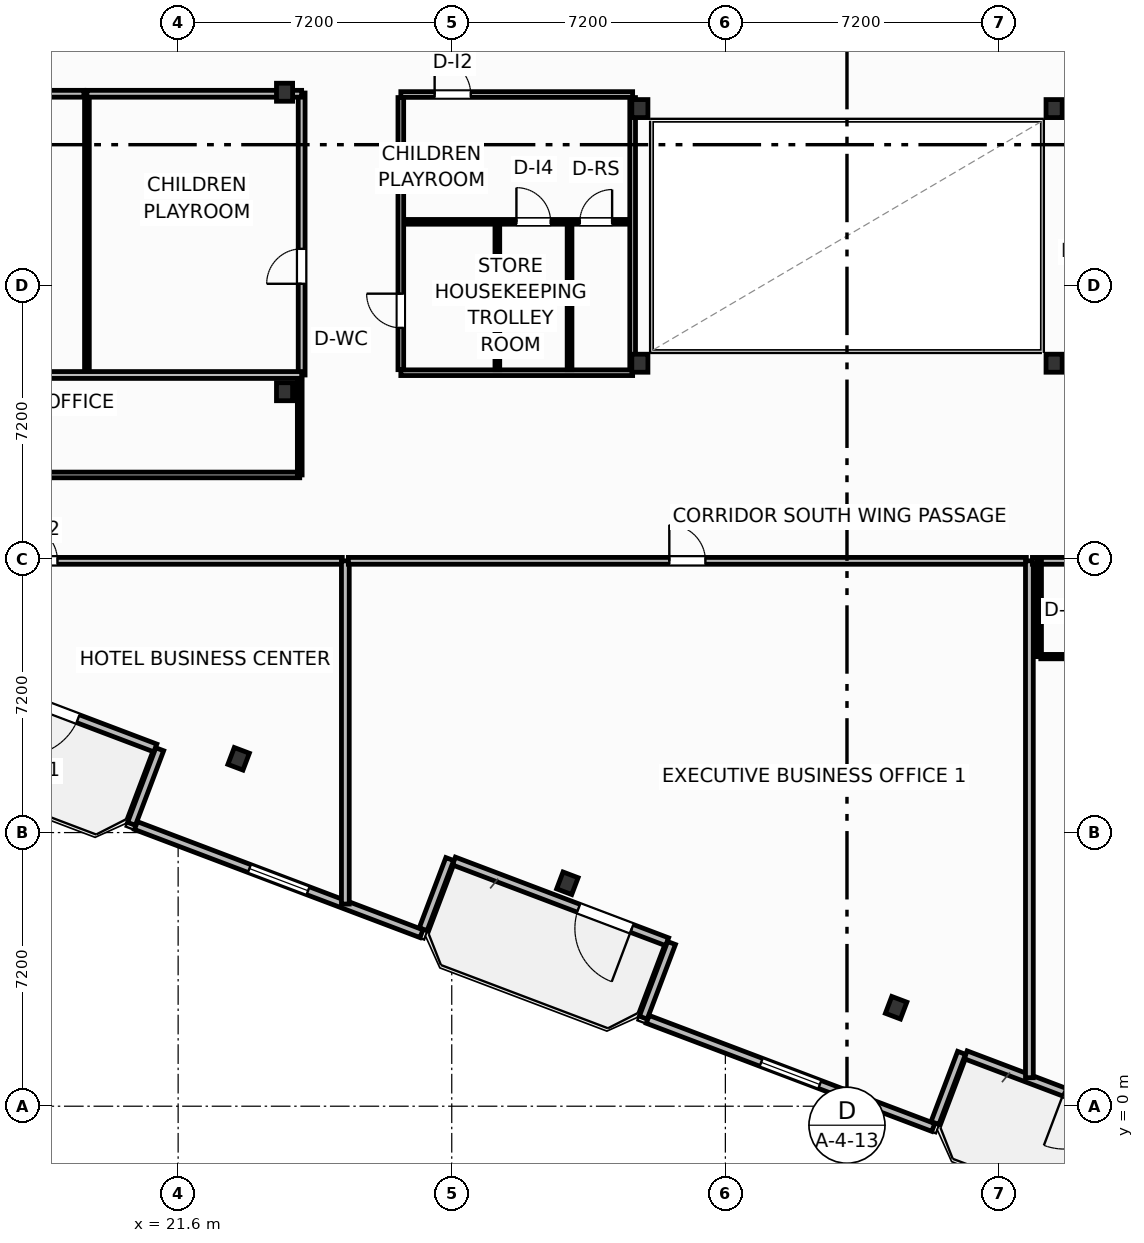
"""IFC4 building model, lengths in metres.
Left out: names, types, materials, properties, quantities, classifications, styles, units other than length and angle.
Written with IfcOpenShell. Run it as: python <this file> out.ifc"""

import sys

from ifc_helpers import new_model, si_unit, direction, frame, frame_2d, origin, origin_2d, place, context, subcontext, project, spatial, rectangle, i_section, extrude, element, fill, save


model = new_model("IFC4")
c1 = context("Model", 3, precision=1e-05, world=origin(), true_north=direction((0.0, 1.0)))
c2 = subcontext(c1, "Body", "Model", "MODEL_VIEW")
j1 = project(units=[si_unit("LENGTHUNIT", "METRE"), si_unit("PLANEANGLEUNIT", "RADIAN")], contexts=[c1])
p1 = place(None, origin())
s1 = spatial("IfcSite", under=j1, at=p1, CompositionType="ELEMENT")
p2 = place(p1, origin())
s2 = spatial("IfcBuilding", under=s1, at=p2, CompositionType="ELEMENT")
p3 = place(p2, frame((0.0, 0.0, 94.7)))
s3 = spatial("IfcBuildingStorey", under=s2, at=p3, CompositionType="ELEMENT", Elevation=94.7)
for number, where, z_axis, x_axis in (
    (1, (33.75, 19.55, 0.0), (0.0, 0.0, 1.0), (1.0, 0.0, 0.0)),
    (2, (44.65, 19.55, 0.0), (0.0, 0.0, 1.0), (1.0, 0.0, 0.0)),
    (3, (33.75, 26.25, 0.0), (0.0, 0.0, 1.0), (1.0, 0.0, 0.0)),
    (4, (44.65, 26.25, 0.0), (0.0, 0.0, 1.0), (1.0, 0.0, 0.0)),
    (5, (24.4, 18.8, 0.0), (0.0, 0.0, 1.0), (1.0, 0.0, 0.0)),
    (6, (24.4, 26.68, 0.0), (0.0, 0.0, 1.0), (1.0, 0.0, 0.0)),
    (7, (23.192, 9.141, 0.0), (0.0, 0.0, 1.0), (0.935, -0.354, 0.0)),
    (8, (31.843, 5.866, 0.0), (0.0, 0.0, 1.0), (0.935, -0.354, 0.0)),
    (9, (40.493, 2.591, 0.0), (0.0, 0.0, 1.0), (0.935, -0.354, 0.0)),
):
    element("IfcColumn", number, at=place(p3, frame(where, z_axis=z_axis, x_axis=x_axis)), inside=s3, PredefinedType="COLUMN", context=c2, shape_type="SweptSolid", body=[
        extrude(i_section(OverallWidth=0.424, OverallDepth=0.474, WebThickness=0.048, FlangeThickness=0.077, FilletRadius=0.025, at=origin_2d()), origin(), (0.0, 0.0, 1.0), 3.7),
    ])
p4 = place(p3, frame((21.0, 9.425, 0.0), z_axis=(0.0, 0.0, 1.0), x_axis=(-0.93521416643, 0.354082565101, 0.0)))
e10 = element("IfcWall", 10, at=p4, inside=s3, PredefinedType="SOLIDWALL", context=c2, shape_type="SweptSolid", body=[
    extrude(rectangle(XDim=6.0, YDim=0.22, at=frame_2d((3.0, 0.0))), origin(), (0.0, 0.0, 1.0), 2.73),
])
p5 = place(p4, frame((2.176, 0.0, 0.0)))
e11 = element("IfcOpeningElement", 11, at=p5, cuts=e10, PredefinedType="OPENING", context=c2, shape_type="SweptSolid", body=[
    extrude(rectangle(XDim=1.5, YDim=2.25, at=frame_2d((0.75, 1.125))), frame((0.0, 0.12, 0.0), z_axis=(0.0, -1.0, 0.0), x_axis=(1.0, 0.0, 0.0)), (0.0, 0.0, 1.0), 0.24),
])
p6 = place(p3, frame((34.468, 4.327, 0.0), z_axis=(0.0, 0.0, 1.0), x_axis=(-0.9352192676, 0.354069091436, 0.0)))
e12 = element("IfcWall", 12, at=p6, inside=s3, PredefinedType="SOLIDWALL", context=c2, shape_type="SweptSolid", body=[
    extrude(rectangle(XDim=6.0, YDim=0.22, at=frame_2d((3.0, 0.0))), origin(), (0.0, 0.0, 1.0), 2.73),
])
p7 = place(p6, frame((0.992, 0.0, 0.0)))
e13 = element("IfcOpeningElement", 13, at=p7, cuts=e12, PredefinedType="OPENING", context=c2, shape_type="SweptSolid", body=[
    extrude(rectangle(XDim=1.5, YDim=2.25, at=frame_2d((0.75, 1.125))), frame((0.0, 0.12, 0.0), z_axis=(0.0, -1.0, 0.0), x_axis=(1.0, 0.0, 0.0)), (0.0, 0.0, 1.0), 0.24),
])
p8 = place(p3, frame((47.935, -0.771, 0.0), z_axis=(0.0, 0.0, 1.0), x_axis=(-0.935227640088, 0.354046976001, 0.0)))
e14 = element("IfcWall", 14, at=p8, inside=s3, PredefinedType="SOLIDWALL", context=c2, shape_type="SweptSolid", body=[
    extrude(rectangle(XDim=6.0, YDim=0.22, at=frame_2d((3.0, 0.0))), origin(), (0.0, 0.0, 1.0), 2.73),
])
p9 = place(p8, frame((1.732, 0.0, 0.0)))
e15 = element("IfcOpeningElement", 15, at=p9, cuts=e14, PredefinedType="OPENING", context=c2, shape_type="SweptSolid", body=[
    extrude(rectangle(XDim=1.5, YDim=2.25, at=frame_2d((0.75, 1.125))), frame((0.0, 0.12, 0.0), z_axis=(0.0, -1.0, 0.0), x_axis=(1.0, 0.0, 0.0)), (0.0, 0.0, 1.0), 0.24),
])
p10 = place(p3, frame((21.116, 9.392, 0.0), z_axis=(0.0, 0.0, 1.0), x_axis=(-0.353988291547, -0.935249854022, 0.0)))
e16 = element("IfcWall", 16, at=p10, inside=s3, PredefinedType="SOLIDWALL", context=c2, shape_type="SweptSolid", body=[
    extrude(rectangle(XDim=2.1, YDim=0.22, at=frame_2d((1.05, 0.0))), origin(), (0.0, 0.0, 1.0), 2.73),
])
p11 = place(p3, frame((20.49, 7.384, 0.0), z_axis=(0.0, 0.0, 1.0), x_axis=(0.935230796934, -0.354038636968, 0.0)))
e17 = element("IfcWall", 17, at=p11, inside=s3, PredefinedType="SOLIDWALL", context=c2, shape_type="SweptSolid", body=[
    extrude(rectangle(XDim=8.035, YDim=0.22, at=frame_2d((4.018, 0.0))), origin(), (0.0, 0.0, 1.0), 2.73),
])
p12 = place(p11, frame((3.192, 0.0, 0.8)))
e18 = element("IfcOpeningElement", 18, at=p12, cuts=e17, PredefinedType="OPENING", context=c2, shape_type="SweptSolid", body=[
    extrude(rectangle(XDim=1.65, YDim=1.65, at=frame_2d((0.825, 0.825))), frame((0.0, 0.12, 0.0), z_axis=(0.0, -1.0, 0.0), x_axis=(1.0, 0.0, 0.0)), (0.0, 0.0, 1.0), 0.24),
])
p13 = place(p3, frame((28.048, 4.656, 0.0), z_axis=(0.0, 0.0, 1.0), x_axis=(0.354128791944, 0.935196663123, 0.0)))
e19 = element("IfcWall", 19, at=p13, inside=s3, PredefinedType="SOLIDWALL", context=c2, shape_type="SweptSolid", body=[
    extrude(rectangle(XDim=1.975, YDim=0.22, at=frame_2d((0.988, 0.0))), origin(), (0.0, 0.0, 1.0), 2.73),
])
p14 = place(p3, frame((34.583, 4.294, 0.0), z_axis=(0.0, 0.0, 1.0), x_axis=(-0.354128469405, -0.935196785258, 0.0)))
e20 = element("IfcWall", 20, at=p14, inside=s3, PredefinedType="SOLIDWALL", context=c2, shape_type="SweptSolid", body=[
    extrude(rectangle(XDim=2.1, YDim=0.22, at=frame_2d((1.05, 0.0))), origin(), (0.0, 0.0, 1.0), 2.73),
])
p15 = place(p3, frame((33.957, 2.286, 0.0), z_axis=(0.0, 0.0, 1.0), x_axis=(0.935220736163, -0.354065212427, 0.0)))
e21 = element("IfcWall", 21, at=p15, inside=s3, PredefinedType="SOLIDWALL", context=c2, shape_type="SweptSolid", body=[
    extrude(rectangle(XDim=8.035, YDim=0.22, at=frame_2d((4.018, 0.0))), origin(), (0.0, 0.0, 1.0), 2.73),
])
p16 = place(p15, frame((3.192, 0.0, 0.8)))
e22 = element("IfcOpeningElement", 22, at=p16, cuts=e21, PredefinedType="OPENING", context=c2, shape_type="SweptSolid", body=[
    extrude(rectangle(XDim=1.65, YDim=1.65, at=frame_2d((0.825, 0.825))), frame((0.0, 0.12, 0.0), z_axis=(0.0, -1.0, 0.0), x_axis=(1.0, 0.0, 0.0)), (0.0, 0.0, 1.0), 0.24),
])
p17 = place(p3, frame((41.516, -0.442, 0.0), z_axis=(0.0, 0.0, 1.0), x_axis=(0.354061611705, 0.935222099352, 0.0)))
e23 = element("IfcWall", 23, at=p17, inside=s3, PredefinedType="SOLIDWALL", context=c2, shape_type="SweptSolid", body=[
    extrude(rectangle(XDim=1.975, YDim=0.22, at=frame_2d((0.987, 0.0))), origin(), (0.0, 0.0, 1.0), 2.73),
])
p18 = place(p3, frame((5.0, 16.61, 0.0), z_axis=(0.0, 0.0, 1.0), x_axis=(1.0, 0.0, 0.0)))
e24 = element("IfcWall", 24, at=p18, inside=s3, PredefinedType="PARTITIONING", context=c2, shape_type="SweptSolid", body=[
    extrude(rectangle(XDim=19.8, YDim=0.15, at=frame_2d((9.9, 0.0))), origin(), (0.0, 0.0, 1.0), 3.45),
])
p19 = place(p18, frame((11.66, 0.0, 0.0)))
e25 = element("IfcOpeningElement", 25, at=p19, cuts=e24, PredefinedType="OPENING", context=c2, shape_type="SweptSolid", body=[
    extrude(rectangle(XDim=0.92, YDim=2.05, at=frame_2d((0.46, 1.025))), frame((0.0, 0.085, 0.0), z_axis=(0.0, -1.0, 0.0), x_axis=(1.0, 0.0, 0.0)), (0.0, 0.0, 1.0), 0.17),
])
p20 = place(p3, frame((24.8, 16.61, 0.0), z_axis=(0.0, 0.0, 1.0), x_axis=(0.0, 1.0, 0.0)))
e26 = element("IfcWall", 26, at=p20, inside=s3, PredefinedType="PARTITIONING", context=c2, shape_type="SweptSolid", body=[
    extrude(rectangle(XDim=2.63, YDim=0.125, at=frame_2d((1.315, 0.0))), origin(), (0.0, 0.0, 1.0), 3.45),
])
p21 = place(p3, frame((2.146, 14.35, 0.0), z_axis=(0.0, 0.0, 1.0), x_axis=(1.0, 0.0, 0.0)))
e27 = element("IfcWall", 27, at=p21, inside=s3, PredefinedType="PARTITIONING", context=c2, shape_type="SweptSolid", body=[
    extrude(rectangle(XDim=23.774, YDim=0.18, at=frame_2d((11.887, 0.0))), origin(), (0.0, 0.0, 1.0), 3.45),
])
p22 = place(p21, frame((15.329, 0.0, 0.0)))
e28 = element("IfcOpeningElement", 28, at=p22, cuts=e27, PredefinedType="OPENING", context=c2, shape_type="SweptSolid", body=[
    extrude(rectangle(XDim=0.95, YDim=2.05, at=frame_2d((0.475, 1.025))), frame((0.0, 0.1, 0.0), z_axis=(0.0, -1.0, 0.0), x_axis=(1.0, 0.0, 0.0)), (0.0, 0.0, 1.0), 0.2),
])
p23 = place(p3, frame((26.0, 5.319, 0.0), z_axis=(0.0, 0.0, 1.0), x_axis=(0.0, 1.0, 0.0)))
e29 = element("IfcWall", 29, at=p23, inside=s3, PredefinedType="PARTITIONING", context=c2, shape_type="SweptSolid", body=[
    extrude(rectangle(XDim=9.031, YDim=0.205, at=frame_2d((4.515, 0.0))), origin(), (0.0, 0.0, 1.0), 3.45),
])
p24 = place(p3, frame((26.08, 14.35, 0.0), z_axis=(0.0, 0.0, 1.0), x_axis=(1.0, 0.0, 0.0)))
e30 = element("IfcWall", 30, at=p24, inside=s3, PredefinedType="PARTITIONING", context=c2, shape_type="SweptSolid", body=[
    extrude(rectangle(XDim=17.84, YDim=0.18, at=frame_2d((8.92, 0.0))), origin(), (0.0, 0.0, 1.0), 3.45),
])
p25 = place(p24, frame((8.445, 0.0, 0.0)))
e31 = element("IfcOpeningElement", 31, at=p25, cuts=e30, PredefinedType="OPENING", context=c2, shape_type="SweptSolid", body=[
    extrude(rectangle(XDim=0.95, YDim=2.05, at=frame_2d((0.475, 1.025))), frame((0.0, 0.1, 0.0), z_axis=(0.0, -1.0, 0.0), x_axis=(1.0, 0.0, 0.0)), (0.0, 0.0, 1.0), 0.2),
])
p26 = place(p3, frame((44.0, 0.75, 0.0), z_axis=(0.0, 0.0, 1.0), x_axis=(0.0, 1.0, 0.0)))
e32 = element("IfcWall", 32, at=p26, inside=s3, PredefinedType="PARTITIONING", context=c2, shape_type="SweptSolid", body=[
    extrude(rectangle(XDim=13.6, YDim=0.205, at=frame_2d((6.8, 0.0))), origin(), (0.0, 0.0, 1.0), 3.45),
])
p27 = place(p3, frame((44.08, 14.35, 0.0), z_axis=(0.0, 0.0, 1.0), x_axis=(1.0, 0.0, 0.0)))
e33 = element("IfcWall", 33, at=p27, inside=s3, PredefinedType="PARTITIONING", context=c2, shape_type="SweptSolid", body=[
    extrude(rectangle(XDim=14.84, YDim=0.18, at=frame_2d((7.42, 0.0))), origin(), (0.0, 0.0, 1.0), 3.45),
])
p28 = place(p27, frame((3.323, 0.0, 0.0)))
e34 = element("IfcOpeningElement", 34, at=p28, cuts=e33, PredefinedType="OPENING", context=c2, shape_type="SweptSolid", body=[
    extrude(rectangle(XDim=0.95, YDim=2.15, at=frame_2d((0.475, 1.075))), frame((0.0, 0.1, 0.0), z_axis=(0.0, -1.0, 0.0), x_axis=(1.0, 0.0, 0.0)), (0.0, 0.0, 1.0), 0.2),
])
p29 = place(p3, frame((44.3, 11.83, 0.0), z_axis=(0.0, 0.0, 1.0), x_axis=(1.0, 0.0, 0.0)))
e35 = element("IfcWall", 35, at=p29, inside=s3, PredefinedType="PARTITIONING", context=c2, shape_type="SweptSolid", body=[
    extrude(rectangle(XDim=2.15, YDim=0.115, at=frame_2d((1.075, 0.0))), origin(), (0.0, 0.0, 1.0), 3.45),
])
p30 = place(p3, frame((44.26, 11.83, 0.0), z_axis=(0.0, 0.0, 1.0), x_axis=(0.0, 1.0, 0.0)))
e36 = element("IfcWall", 36, at=p30, inside=s3, PredefinedType="PARTITIONING", context=c2, shape_type="SweptSolid", body=[
    extrude(rectangle(XDim=2.52, YDim=0.115, at=frame_2d((1.26, 0.0))), origin(), (0.0, 0.0, 1.0), 3.45),
])
p31 = place(p3, frame((-0.094, 26.64, 0.0), z_axis=(0.0, 0.0, 1.0), x_axis=(1.0, 0.0, 0.0)))
e37 = element("IfcWall", 37, at=p31, inside=s3, PredefinedType="PARTITIONING", context=c2, shape_type="SweptSolid", body=[
    extrude(rectangle(XDim=19.214, YDim=0.18, at=frame_2d((9.607, 0.0))), origin(), (0.0, 0.0, 1.0), 3.45),
])
p32 = place(p31, frame((13.923, 0.0, 0.0)))
e38 = element("IfcOpeningElement", 38, at=p32, cuts=e37, PredefinedType="OPENING", context=c2, shape_type="SweptSolid", body=[
    extrude(rectangle(XDim=0.92, YDim=2.05, at=frame_2d((0.46, 1.025))), frame((0.0, 0.1, 0.0), z_axis=(0.0, -1.0, 0.0), x_axis=(1.0, 0.0, 0.0)), (0.0, 0.0, 1.0), 0.2),
])
p33 = place(p3, frame((24.85, 19.24, 0.0), z_axis=(0.0, 0.0, 1.0), x_axis=(0.0, 1.0, 0.0)))
e39 = element("IfcWall", 39, at=p33, inside=s3, PredefinedType="PARTITIONING", context=c2, shape_type="SweptSolid", body=[
    extrude(rectangle(XDim=7.42, YDim=0.18, at=frame_2d((3.71, 0.0))), origin(), (0.0, 0.0, 1.0), 3.45),
])
p34 = place(p33, frame((2.4, 0.0, 0.0)))
e40 = element("IfcOpeningElement", 40, at=p34, cuts=e39, PredefinedType="OPENING", context=c2, shape_type="SweptSolid", body=[
    extrude(rectangle(XDim=0.92, YDim=2.05, at=frame_2d((0.46, 1.025))), frame((0.0, 0.1, 0.0), z_axis=(0.0, -1.0, 0.0), x_axis=(1.0, 0.0, 0.0)), (0.0, 0.0, 1.0), 0.2),
])
p35 = place(p3, frame((19.2, 19.24, 0.0), z_axis=(0.0, 0.0, 1.0), x_axis=(0.0, 1.0, 0.0)))
e41 = element("IfcWall", 41, at=p35, inside=s3, PredefinedType="PARTITIONING", context=c2, shape_type="SweptSolid", body=[
    extrude(rectangle(XDim=7.42, YDim=0.125, at=frame_2d((3.71, 0.0))), origin(), (0.0, 0.0, 1.0), 3.45),
])
p36 = place(p3, frame((0.2, 19.24, 0.0), z_axis=(0.0, 0.0, 1.0), x_axis=(1.0, 0.0, 0.0)))
e42 = element("IfcWall", 42, at=p36, inside=s3, PredefinedType="PARTITIONING", context=c2, shape_type="SweptSolid", body=[
    extrude(rectangle(XDim=24.65, YDim=0.18, at=frame_2d((12.325, 0.0))), origin(), (0.0, 0.0, 1.0), 3.45),
])
p37 = place(p3, frame((19.2, 26.64, 0.0), z_axis=(0.0, 0.0, 1.0), x_axis=(1.0, 0.0, 0.0)))
e43 = element("IfcWall", 43, at=p37, inside=s3, PredefinedType="PARTITIONING", context=c2, shape_type="SweptSolid", body=[
    extrude(rectangle(XDim=5.65, YDim=0.18, at=frame_2d((2.825, 0.0))), origin(), (0.0, 0.0, 1.0), 2.662),
])
p38 = place(p3, frame((27.46, 26.62, 0.0), z_axis=(0.0, 0.0, 1.0), x_axis=(1.0, 0.0, 0.0)))
e44 = element("IfcWall", 44, at=p38, inside=s3, PredefinedType="PARTITIONING", context=c2, shape_type="SweptSolid", body=[
    extrude(rectangle(XDim=6.1, YDim=0.15, at=frame_2d((3.05, 0.0))), origin(), (0.0, 0.0, 1.0), 2.662),
])
p39 = place(p38, frame((0.89, 0.0, 0.0)))
e45 = element("IfcOpeningElement", 45, at=p39, cuts=e44, PredefinedType="OPENING", context=c2, shape_type="SweptSolid", body=[
    extrude(rectangle(XDim=0.95, YDim=2.05, at=frame_2d((0.475, 1.025))), frame((0.0, 0.085, 0.0), z_axis=(0.0, -1.0, 0.0), x_axis=(1.0, 0.0, 0.0)), (0.0, 0.0, 1.0), 0.17),
])
p40 = place(p3, frame((27.46, 19.3, 0.0), z_axis=(0.0, 0.0, 1.0), x_axis=(1.0, 0.0, 0.0)))
e46 = element("IfcWall", 46, at=p40, inside=s3, PredefinedType="PARTITIONING", context=c2, shape_type="SweptSolid", body=[
    extrude(rectangle(XDim=6.1, YDim=0.15, at=frame_2d((3.05, 0.0))), origin(), (0.0, 0.0, 1.0), 2.662),
])
p41 = place(p3, frame((27.52, 23.27, 0.0), z_axis=(0.0, 0.0, 1.0), x_axis=(1.0, 0.0, 0.0)))
e47 = element("IfcWall", 47, at=p41, inside=s3, PredefinedType="PARTITIONING", context=c2, shape_type="SweptSolid", body=[
    extrude(rectangle(XDim=6.0, YDim=0.125, at=frame_2d((3.0, 0.0))), origin(), (0.0, 0.0, 1.0), 3.45),
])
p42 = place(p41, frame((2.982, 0.0, 0.0)))
e48 = element("IfcOpeningElement", 48, at=p42, cuts=e47, PredefinedType="OPENING", context=c2, shape_type="SweptSolid", body=[
    extrude(rectangle(XDim=0.9, YDim=2.05, at=frame_2d((0.45, 1.025))), frame((0.0, 0.073, 0.0), z_axis=(0.0, -1.0, 0.0), x_axis=(1.0, 0.0, 0.0)), (0.0, 0.0, 1.0), 0.145),
])
p43 = place(p41, frame((4.65, 0.0, 0.0)))
e49 = element("IfcOpeningElement", 49, at=p43, cuts=e47, PredefinedType="OPENING", context=c2, shape_type="SweptSolid", body=[
    extrude(rectangle(XDim=0.85, YDim=2.05, at=frame_2d((0.425, 1.025))), frame((0.0, 0.073, 0.0), z_axis=(0.0, -1.0, 0.0), x_axis=(1.0, 0.0, 0.0)), (0.0, 0.0, 1.0), 0.145),
])
for number, where, z_axis, x_axis in (
    (50, (30.0, 19.38, 0.0), (0.0, 0.0, 1.0), (0.0, 1.0, 0.0)),
    (51, (31.9, 19.38, 0.0), (0.0, 0.0, 1.0), (0.0, 1.0, 0.0)),
):
    element("IfcWall", number, at=place(p3, frame(where, z_axis=z_axis, x_axis=x_axis)), inside=s3, PredefinedType="PARTITIONING", context=c2, shape_type="SweptSolid", body=[
        extrude(rectangle(XDim=3.82, YDim=0.125, at=frame_2d((1.91, 0.0))), origin(), (0.0, 0.0, 1.0), 3.45),
    ])
p44 = place(p3, frame((27.46, 19.38, 0.0), z_axis=(0.0, 0.0, 1.0), x_axis=(0.0, 1.0, 0.0)))
e52 = element("IfcWall", 52, at=p44, inside=s3, PredefinedType="PARTITIONING", context=c2, shape_type="SweptSolid", body=[
    extrude(rectangle(XDim=7.16, YDim=0.15, at=frame_2d((3.58, 0.0))), origin(), (0.0, 0.0, 1.0), 3.45),
])
p45 = place(p44, frame((1.1, 0.0, 0.0)))
e53 = element("IfcOpeningElement", 53, at=p45, cuts=e52, PredefinedType="OPENING", context=c2, shape_type="SweptSolid", body=[
    extrude(rectangle(XDim=0.9, YDim=2.05, at=frame_2d((0.45, 1.025))), frame((0.0, 0.085, 0.0), z_axis=(0.0, -1.0, 0.0), x_axis=(1.0, 0.0, 0.0)), (0.0, 0.0, 1.0), 0.17),
])
p46 = place(p3, frame((33.56, 19.38, 0.0), z_axis=(0.0, 0.0, 1.0), x_axis=(0.0, 1.0, 0.0)))
e54 = element("IfcWall", 54, at=p46, inside=s3, PredefinedType="PARTITIONING", context=c2, shape_type="SweptSolid", body=[
    extrude(rectangle(XDim=7.16, YDim=0.15, at=frame_2d((3.58, 0.0))), origin(), (0.0, 0.0, 1.0), 2.824),
])
p47 = place(p5, origin())
e55 = element("IfcDoor", 55, at=p47, inside=s3, OperationType="SINGLE_SWING_RIGHT", PredefinedType="DOOR", context=c2, shape_type="SweptSolid", body=[
    extrude(rectangle(XDim=1.5, YDim=2.25, at=frame_2d((0.75, 1.125))), frame((0.0, 0.025, 0.0), z_axis=(0.0, -1.0, 0.0), x_axis=(1.0, 0.0, 0.0)), (0.0, 0.0, 1.0), 0.05),
])
fill(e11, e55)
p48 = place(p7, origin())
e56 = element("IfcDoor", 56, at=p48, inside=s3, OperationType="SINGLE_SWING_LEFT", PredefinedType="DOOR", context=c2, shape_type="SweptSolid", body=[
    extrude(rectangle(XDim=1.5, YDim=2.25, at=frame_2d((0.75, 1.125))), frame((0.0, 0.025, 0.0), z_axis=(0.0, -1.0, 0.0), x_axis=(1.0, 0.0, 0.0)), (0.0, 0.0, 1.0), 0.05),
])
fill(e13, e56)
p49 = place(p9, origin())
e57 = element("IfcDoor", 57, at=p49, inside=s3, OperationType="SINGLE_SWING_RIGHT", PredefinedType="DOOR", context=c2, shape_type="SweptSolid", body=[
    extrude(rectangle(XDim=1.5, YDim=2.25, at=frame_2d((0.75, 1.125))), frame((0.0, 0.025, 0.0), z_axis=(0.0, -1.0, 0.0), x_axis=(1.0, 0.0, 0.0)), (0.0, 0.0, 1.0), 0.05),
])
fill(e15, e57)
p50 = place(p12, origin())
e58 = element("IfcWindow", 58, at=p50, inside=s3, PartitioningType="SINGLE_PANEL", PredefinedType="WINDOW", context=c2, shape_type="SweptSolid", body=[
    extrude(rectangle(XDim=1.65, YDim=1.65, at=frame_2d((0.825, 0.825))), frame((0.0, 0.03, 0.0), z_axis=(0.0, -1.0, 0.0), x_axis=(1.0, 0.0, 0.0)), (0.0, 0.0, 1.0), 0.06),
])
fill(e18, e58)
p51 = place(p16, origin())
e59 = element("IfcWindow", 59, at=p51, inside=s3, PartitioningType="SINGLE_PANEL", PredefinedType="WINDOW", context=c2, shape_type="SweptSolid", body=[
    extrude(rectangle(XDim=1.65, YDim=1.65, at=frame_2d((0.825, 0.825))), frame((0.0, 0.03, 0.0), z_axis=(0.0, -1.0, 0.0), x_axis=(1.0, 0.0, 0.0)), (0.0, 0.0, 1.0), 0.06),
])
fill(e22, e59)
p52 = place(p22, origin())
e60 = element("IfcDoor", 60, at=p52, inside=s3, OperationType="SINGLE_SWING_LEFT", PredefinedType="DOOR", context=c2, shape_type="SweptSolid", body=[
    extrude(rectangle(XDim=0.95, YDim=2.05, at=frame_2d((0.475, 1.025))), frame((0.0, 0.025, 0.0), z_axis=(0.0, -1.0, 0.0), x_axis=(1.0, 0.0, 0.0)), (0.0, 0.0, 1.0), 0.05),
])
fill(e28, e60)
p53 = place(p25, origin())
e61 = element("IfcDoor", 61, at=p53, inside=s3, OperationType="SINGLE_SWING_LEFT", PredefinedType="DOOR", context=c2, shape_type="SweptSolid", body=[
    extrude(rectangle(XDim=0.95, YDim=2.05, at=frame_2d((0.475, 1.025))), frame((0.0, 0.025, 0.0), z_axis=(0.0, -1.0, 0.0), x_axis=(1.0, 0.0, 0.0)), (0.0, 0.0, 1.0), 0.05),
])
fill(e31, e61)
p54 = place(p34, origin())
e62 = element("IfcDoor", 62, at=p54, inside=s3, OperationType="SINGLE_SWING_LEFT", PredefinedType="DOOR", context=c2, shape_type="SweptSolid", body=[
    extrude(rectangle(XDim=0.92, YDim=2.05, at=frame_2d((0.46, 1.025))), frame((0.0, 0.025, 0.0), z_axis=(0.0, -1.0, 0.0), x_axis=(1.0, 0.0, 0.0)), (0.0, 0.0, 1.0), 0.05),
])
fill(e40, e62)
p55 = place(p39, origin())
e63 = element("IfcDoor", 63, at=p55, inside=s3, OperationType="SINGLE_SWING_LEFT", PredefinedType="DOOR", context=c2, shape_type="SweptSolid", body=[
    extrude(rectangle(XDim=0.95, YDim=2.05, at=frame_2d((0.475, 1.025))), frame((0.0, 0.025, 0.0), z_axis=(0.0, -1.0, 0.0), x_axis=(1.0, 0.0, 0.0)), (0.0, 0.0, 1.0), 0.05),
])
fill(e45, e63)
p56 = place(p42, origin())
e64 = element("IfcDoor", 64, at=p56, inside=s3, OperationType="SINGLE_SWING_LEFT", PredefinedType="DOOR", context=c2, shape_type="SweptSolid", body=[
    extrude(rectangle(XDim=0.9, YDim=2.05, at=frame_2d((0.45, 1.025))), frame((0.0, 0.025, 0.0), z_axis=(0.0, -1.0, 0.0), x_axis=(1.0, 0.0, 0.0)), (0.0, 0.0, 1.0), 0.05),
])
fill(e48, e64)
p57 = place(p43, origin())
e65 = element("IfcDoor", 65, at=p57, inside=s3, OperationType="SINGLE_SWING_RIGHT", PredefinedType="DOOR", context=c2, shape_type="SweptSolid", body=[
    extrude(rectangle(XDim=0.85, YDim=2.05, at=frame_2d((0.425, 1.025))), frame((0.0, 0.025, 0.0), z_axis=(0.0, -1.0, 0.0), x_axis=(1.0, 0.0, 0.0)), (0.0, 0.0, 1.0), 0.05),
])
fill(e49, e65)
p58 = place(p45, origin())
e66 = element("IfcDoor", 66, at=p58, inside=s3, OperationType="SINGLE_SWING_RIGHT", PredefinedType="DOOR", context=c2, shape_type="SweptSolid", body=[
    extrude(rectangle(XDim=0.9, YDim=2.05, at=frame_2d((0.45, 1.025))), frame((0.0, 0.025, 0.0), z_axis=(0.0, -1.0, 0.0), x_axis=(1.0, 0.0, 0.0)), (0.0, 0.0, 1.0), 0.05),
])
fill(e53, e66)
save(model, sys.argv[1])
